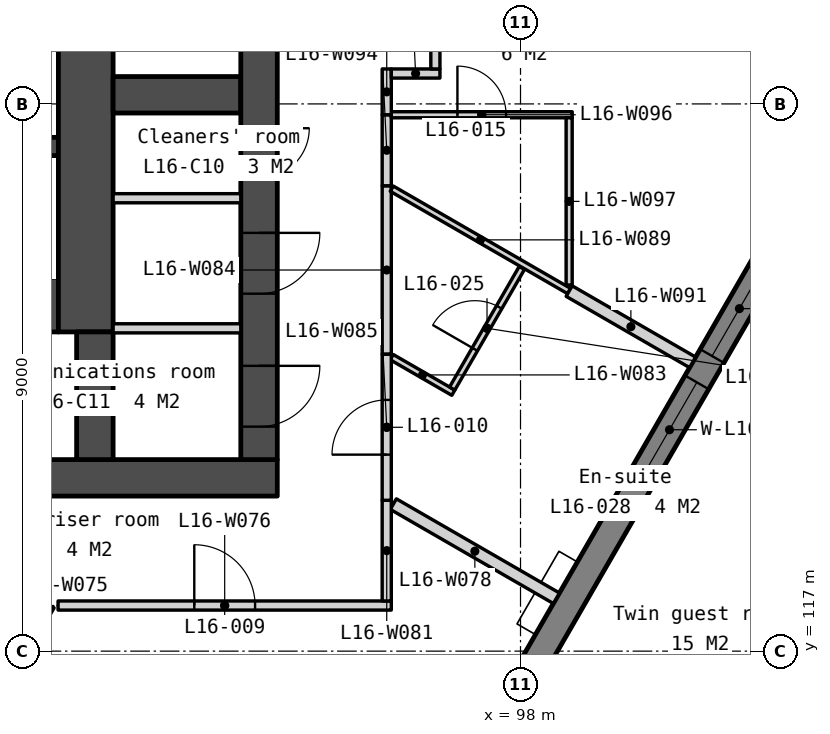
"""IFC4 building model, lengths in metres.
Left out: names, types, materials, properties, quantities, classifications, styles, units other than length and angle.
Written with IfcOpenShell. Run it as: python <this file> out.ifc"""

import sys

from ifc_helpers import new_model, si_unit, direction, frame, frame_2d, origin, place, context, subcontext, project, spatial, polyline, rectangle, outline, extrude, element, fill, save


model = new_model("IFC4")
c1 = context("Model", 3, precision=1e-05, world=origin(), true_north=direction((0.0, 1.0)))
c2 = subcontext(c1, "Body", "Model", "MODEL_VIEW")
j1 = project(units=[si_unit("LENGTHUNIT", "METRE"), si_unit("PLANEANGLEUNIT", "RADIAN")], contexts=[c1])
p1 = place(None, origin())
s1 = spatial("IfcSite", under=j1, at=p1, CompositionType="ELEMENT")
p2 = place(p1, origin())
s2 = spatial("IfcBuilding", under=s1, at=p2, CompositionType="ELEMENT")
p3 = place(p2, frame((0.0, 0.0, 70.0)))
s3 = spatial("IfcBuildingStorey", under=s2, at=p3, CompositionType="ELEMENT", Elevation=70.0)
p4 = place(p3, frame((66.0, 119.85, 0.0), z_axis=(0.0, 0.0, 1.0), x_axis=(1.0, 0.0, 0.0)))
e1 = element("IfcWall", 1, at=p4, inside=s3, PredefinedType="SOLIDWALL", context=c2, shape_type="SweptSolid", body=[
    extrude(rectangle(XDim=28.0, YDim=0.6, at=frame_2d((14.0, 0.0))), origin(), (0.0, 0.0, 1.0), 3.35),
])
p5 = place(p4, frame((6.825, 0.0, 0.0)))
e2 = element("IfcOpeningElement", 2, at=p5, cuts=e1, PredefinedType="OPENING", context=c2, shape_type="SweptSolid", body=[
    extrude(rectangle(XDim=1.8, YDim=2.1, at=frame_2d((0.9, 1.05))), frame((0.0, 0.31, 0.0), z_axis=(0.0, -1.0, 0.0), x_axis=(1.0, 0.0, 0.0)), (0.0, 0.0, 1.0), 0.62),
])
p6 = place(p4, frame((15.85, 0.0, 0.0)))
e3 = element("IfcOpeningElement", 3, at=p6, cuts=e1, PredefinedType="OPENING", context=c2, shape_type="SweptSolid", body=[
    extrude(rectangle(XDim=1.5, YDim=2.1, at=frame_2d((0.75, 1.05))), frame((0.0, 0.31, 0.0), z_axis=(0.0, -1.0, 0.0), x_axis=(1.0, 0.0, 0.0)), (0.0, 0.0, 1.0), 0.62),
])
p7 = place(p4, frame((19.375, 0.0, 0.0)))
e4 = element("IfcOpeningElement", 4, at=p7, cuts=e1, PredefinedType="OPENING", context=c2, shape_type="SweptSolid", body=[
    extrude(rectangle(XDim=1.8, YDim=2.1, at=frame_2d((0.9, 1.05))), frame((0.0, 0.31, 0.0), z_axis=(0.0, -1.0, 0.0), x_axis=(1.0, 0.0, 0.0)), (0.0, 0.0, 1.0), 0.62),
])
p8 = place(p4, frame((4.425, 0.0, 0.0)))
e5 = element("IfcOpeningElement", 5, at=p8, cuts=e1, PredefinedType="OPENING", context=c2, shape_type="SweptSolid", body=[
    extrude(rectangle(XDim=1.0, YDim=2.1, at=frame_2d((0.5, 1.05))), frame((0.0, 0.31, 0.0), z_axis=(0.0, -1.0, 0.0), x_axis=(1.0, 0.0, 0.0)), (0.0, 0.0, 1.0), 0.62),
])
p9 = place(p4, frame((9.783, 0.0, 0.0)))
e6 = element("IfcOpeningElement", 6, at=p9, cuts=e1, PredefinedType="OPENING", context=c2, shape_type="SweptSolid", body=[
    extrude(rectangle(XDim=1.0, YDim=2.1, at=frame_2d((0.5, 1.05))), frame((0.0, 0.31, 0.0), z_axis=(0.0, -1.0, 0.0), x_axis=(1.0, 0.0, 0.0)), (0.0, 0.0, 1.0), 0.62),
])
p10 = place(p4, frame((11.525, 0.0, 0.0)))
e7 = element("IfcOpeningElement", 7, at=p10, cuts=e1, PredefinedType="OPENING", context=c2, shape_type="SweptSolid", body=[
    extrude(rectangle(XDim=1.0, YDim=2.1, at=frame_2d((0.5, 1.05))), frame((0.0, 0.31, 0.0), z_axis=(0.0, -1.0, 0.0), x_axis=(1.0, 0.0, 0.0)), (0.0, 0.0, 1.0), 0.62),
])
p11 = place(p4, frame((13.658, 0.0, 0.0)))
e8 = element("IfcOpeningElement", 8, at=p11, cuts=e1, PredefinedType="OPENING", context=c2, shape_type="SweptSolid", body=[
    extrude(rectangle(XDim=1.0, YDim=2.1, at=frame_2d((0.5, 1.05))), frame((0.0, 0.31, 0.0), z_axis=(0.0, -1.0, 0.0), x_axis=(1.0, 0.0, 0.0)), (0.0, 0.0, 1.0), 0.62),
])
p12 = place(p4, frame((22.575, 0.0, 0.0)))
e9 = element("IfcOpeningElement", 9, at=p12, cuts=e1, PredefinedType="OPENING", context=c2, shape_type="SweptSolid", body=[
    extrude(rectangle(XDim=1.0, YDim=2.1, at=frame_2d((0.5, 1.05))), frame((0.0, 0.31, 0.0), z_axis=(0.0, -1.0, 0.0), x_axis=(1.0, 0.0, 0.0)), (0.0, 0.0, 1.0), 0.62),
])
p13 = place(p3, frame((87.85, 125.3, 0.0), z_axis=(0.0, 0.0, 1.0), x_axis=(1.0, 0.0, 0.0)))
e10 = element("IfcWall", 10, at=p13, inside=s3, PredefinedType="SOLIDWALL", context=c2, shape_type="SweptSolid", body=[
    extrude(rectangle(XDim=2.55, YDim=0.3, at=frame_2d((1.275, 0.0))), origin(), (0.0, 0.0, 1.0), 3.35),
])
p14 = place(p3, frame((87.85, 122.7, 0.0), z_axis=(0.0, 0.0, 1.0), x_axis=(1.0, 0.0, 0.0)))
e11 = element("IfcWall", 11, at=p14, inside=s3, PredefinedType="SOLIDWALL", context=c2, shape_type="SweptSolid", body=[
    extrude(rectangle(XDim=2.55, YDim=0.9, at=frame_2d((1.275, 0.0))), origin(), (0.0, 0.0, 1.0), 3.35),
])
p15 = place(p3, frame((90.85, 133.95, 0.0), z_axis=(0.0, 0.0, 1.0), x_axis=(0.0, -1.0, 0.0)))
e12 = element("IfcWall", 12, at=p15, inside=s3, PredefinedType="SOLIDWALL", context=c2, shape_type="SweptSolid", body=[
    extrude(rectangle(XDim=11.7, YDim=0.9, at=frame_2d((5.85, 0.0))), origin(), (0.0, 0.0, 1.0), 3.35),
])
p16 = place(p3, frame((91.0, 122.25, 0.0), z_axis=(0.0, 0.0, 1.0), x_axis=(0.0, -1.0, 0.0)))
e13 = element("IfcWall", 13, at=p16, inside=s3, PredefinedType="SOLIDWALL", context=c2, shape_type="SweptSolid", body=[
    extrude(rectangle(XDim=2.1, YDim=0.6, at=frame_2d((1.05, 0.0))), origin(), (0.0, 0.0, 1.0), 3.35),
])
p17 = place(p3, frame((91.3, 126.15, 0.0), z_axis=(0.0, 0.0, 1.0), x_axis=(1.0, 0.0, 0.0)))
e14 = element("IfcWall", 14, at=p17, inside=s3, PredefinedType="SOLIDWALL", context=c2, shape_type="SweptSolid", body=[
    extrude(rectangle(XDim=2.1, YDim=0.6, at=frame_2d((1.05, 0.0))), origin(), (0.0, 0.0, 1.0), 3.35),
])
for number, where, z_axis, x_axis in (
    (15, (91.3, 124.449, 0.0), (0.0, 0.0, 1.0), (1.0, 0.0, 0.0)),
    (16, (91.3, 122.309, 0.0), (0.0, 0.0, 1.0), (1.0, 0.0, 0.0)),
):
    element("IfcWall", number, at=place(p3, frame(where, z_axis=z_axis, x_axis=x_axis)), inside=s3, PredefinedType="PARTITIONING", context=c2, shape_type="SweptSolid", body=[
        extrude(rectangle(XDim=2.1, YDim=0.15, at=frame_2d((1.05, 0.0))), origin(), (0.0, 0.0, 1.0), 3.35),
    ])
p18 = place(p3, frame((93.7, 133.95, 0.0), z_axis=(0.0, 0.0, 1.0), x_axis=(0.0, -1.0, 0.0)))
e17 = element("IfcWall", 17, at=p18, inside=s3, PredefinedType="SOLIDWALL", context=c2, shape_type="SweptSolid", body=[
    extrude(rectangle(XDim=13.8, YDim=0.6, at=frame_2d((6.9, 0.0))), origin(), (0.0, 0.0, 1.0), 3.35),
])
p19 = place(p18, frame((0.6, 0.0, 0.0)))
e18 = element("IfcOpeningElement", 18, at=p19, cuts=e17, PredefinedType="OPENING", context=c2, shape_type="SweptSolid", body=[
    extrude(rectangle(XDim=1.1, YDim=2.1, at=frame_2d((0.55, 1.05))), frame((0.0, 0.31, 0.0), z_axis=(0.0, -1.0, 0.0), x_axis=(1.0, 0.0, 0.0)), (0.0, 0.0, 1.0), 0.62),
])
p20 = place(p18, frame((8.35, 0.0, 0.0)))
e19 = element("IfcOpeningElement", 19, at=p20, cuts=e17, PredefinedType="OPENING", context=c2, shape_type="SweptSolid", body=[
    extrude(rectangle(XDim=0.826, YDim=2.1, at=frame_2d((0.413, 1.05))), frame((0.0, 0.31, 0.0), z_axis=(0.0, -1.0, 0.0), x_axis=(1.0, 0.0, 0.0)), (0.0, 0.0, 1.0), 0.62),
])
p21 = place(p18, frame((10.071, 0.0, 0.0)))
e20 = element("IfcOpeningElement", 20, at=p21, cuts=e17, PredefinedType="OPENING", context=c2, shape_type="SweptSolid", body=[
    extrude(rectangle(XDim=1.0, YDim=2.1, at=frame_2d((0.5, 1.05))), frame((0.0, 0.31, 0.0), z_axis=(0.0, -1.0, 0.0), x_axis=(1.0, 0.0, 0.0)), (0.0, 0.0, 1.0), 0.62),
])
p22 = place(p18, frame((12.258, 0.0, 0.0)))
e21 = element("IfcOpeningElement", 21, at=p22, cuts=e17, PredefinedType="OPENING", context=c2, shape_type="SweptSolid", body=[
    extrude(rectangle(XDim=1.0, YDim=2.1, at=frame_2d((0.5, 1.05))), frame((0.0, 0.31, 0.0), z_axis=(0.0, -1.0, 0.0), x_axis=(1.0, 0.0, 0.0)), (0.0, 0.0, 1.0), 0.62),
])
p23 = place(p3, frame((88.435, 99.831, -0.15), z_axis=(0.0, 0.0, 1.0), x_axis=(0.500000806382, 0.866024938219, 0.0)))
e22 = element("IfcWall", 22, at=p23, inside=s3, PredefinedType="SOLIDWALL", context=c2, shape_type="SweptSolid", body=[
    extrude(outline(polyline([(34.14, 3.5), (34.14, 0.0), (0.0, 0.0), (0.0, 3.5), (34.14, 3.5)])), frame((0.0, 0.225, 0.0), z_axis=(0.0, -1.0, 0.0), x_axis=(1.0, 0.0, 0.0)), (0.0, 0.0, 1.0), 0.45),
])
p24 = place(p23, frame((5.21, 0.0, 1.05)))
e23 = element("IfcOpeningElement", 23, at=p24, cuts=e22, PredefinedType="OPENING", context=c2, shape_type="SweptSolid", body=[
    extrude(rectangle(XDim=1.8, YDim=1.5, at=frame_2d((0.9, 0.75))), frame((0.0, 0.235, 0.0), z_axis=(0.0, -1.0, 0.0), x_axis=(1.0, 0.0, 0.0)), (0.0, 0.0, 1.0), 0.47),
])
p25 = place(p23, frame((7.51, 0.0, 1.05)))
e24 = element("IfcOpeningElement", 24, at=p25, cuts=e22, PredefinedType="OPENING", context=c2, shape_type="SweptSolid", body=[
    extrude(rectangle(XDim=1.8, YDim=1.5, at=frame_2d((0.9, 0.75))), frame((0.0, 0.235, 0.0), z_axis=(0.0, -1.0, 0.0), x_axis=(1.0, 0.0, 0.0)), (0.0, 0.0, 1.0), 0.47),
])
p26 = place(p23, frame((14.17, 0.0, 1.05)))
e25 = element("IfcOpeningElement", 25, at=p26, cuts=e22, PredefinedType="OPENING", context=c2, shape_type="SweptSolid", body=[
    extrude(rectangle(XDim=1.8, YDim=1.5, at=frame_2d((0.9, 0.75))), frame((0.0, 0.235, 0.0), z_axis=(0.0, -1.0, 0.0), x_axis=(1.0, 0.0, 0.0)), (0.0, 0.0, 1.0), 0.47),
])
p27 = place(p23, frame((16.47, 0.0, 1.05)))
e26 = element("IfcOpeningElement", 26, at=p27, cuts=e22, PredefinedType="OPENING", context=c2, shape_type="SweptSolid", body=[
    extrude(rectangle(XDim=1.8, YDim=1.5, at=frame_2d((0.9, 0.75))), frame((0.0, 0.235, 0.0), z_axis=(0.0, -1.0, 0.0), x_axis=(1.0, 0.0, 0.0)), (0.0, 0.0, 1.0), 0.47),
])
p28 = place(p23, frame((23.13, 0.0, 1.05)))
e27 = element("IfcOpeningElement", 27, at=p28, cuts=e22, PredefinedType="OPENING", context=c2, shape_type="SweptSolid", body=[
    extrude(rectangle(XDim=1.8, YDim=1.5, at=frame_2d((0.9, 0.75))), frame((0.0, 0.235, 0.0), z_axis=(0.0, -1.0, 0.0), x_axis=(1.0, 0.0, 0.0)), (0.0, 0.0, 1.0), 0.47),
])
p29 = place(p23, frame((25.43, 0.0, 1.05)))
e28 = element("IfcOpeningElement", 28, at=p29, cuts=e22, PredefinedType="OPENING", context=c2, shape_type="SweptSolid", body=[
    extrude(rectangle(XDim=1.8, YDim=1.5, at=frame_2d((0.9, 0.75))), frame((0.0, 0.235, 0.0), z_axis=(0.0, -1.0, 0.0), x_axis=(1.0, 0.0, 0.0)), (0.0, 0.0, 1.0), 0.47),
])
p30 = place(p23, frame((32.154, 0.0, 1.05)))
e29 = element("IfcOpeningElement", 29, at=p30, cuts=e22, PredefinedType="OPENING", context=c2, shape_type="SweptSolid", body=[
    extrude(rectangle(XDim=1.2, YDim=1.5, at=frame_2d((0.6, 0.75))), frame((0.0, 0.235, 0.0), z_axis=(0.0, -1.0, 0.0), x_axis=(1.0, 0.0, 0.0)), (0.0, 0.0, 1.0), 0.47),
])
p31 = place(p3, frame((89.268, 116.023, 0.0), z_axis=(0.0, 0.0, 1.0), x_axis=(0.499906209203, 0.866079547155, 0.0)))
e30 = element("IfcWall", 30, at=p31, inside=s3, PredefinedType="PARTITIONING", context=c2, shape_type="SweptSolid", body=[
    extrude(rectangle(XDim=1.994, YDim=0.15, at=frame_2d((0.997, 0.0))), origin(), (0.0, 0.0, 1.0), 3.35),
])
p32 = place(p3, frame((90.395, 117.75, 0.0), z_axis=(0.0, 0.0, 1.0), x_axis=(1.0, 0.0, 0.0)))
e31 = element("IfcWall", 31, at=p32, inside=s3, PredefinedType="PARTITIONING", context=c2, shape_type="SweptSolid", body=[
    extrude(rectangle(XDim=5.48, YDim=0.15, at=frame_2d((2.74, 0.0))), origin(), (0.0, 0.0, 1.0), 3.35),
])
p33 = place(p32, frame((2.24, 0.0, 0.0)))
e32 = element("IfcOpeningElement", 32, at=p33, cuts=e31, PredefinedType="OPENING", context=c2, shape_type="SweptSolid", body=[
    extrude(rectangle(XDim=1.0, YDim=2.1, at=frame_2d((0.5, 1.05))), frame((0.0, 0.085, 0.0), z_axis=(0.0, -1.0, 0.0), x_axis=(1.0, 0.0, 0.0)), (0.0, 0.0, 1.0), 0.17),
])
p34 = place(p3, frame((95.908, 119.418, 0.0), z_axis=(0.0, 0.0, 1.0), x_axis=(0.866051688794, -0.499954470265, 0.0)))
e33 = element("IfcWall", 33, at=p34, inside=s3, PredefinedType="PARTITIONING", context=c2, shape_type="SweptSolid", body=[
    extrude(rectangle(XDim=3.097, YDim=0.2, at=frame_2d((1.548, 0.0))), origin(), (0.0, 0.0, 1.0), 3.35),
])
p35 = place(p3, frame((95.8, 117.825, 0.0), z_axis=(0.0, 0.0, 1.0), x_axis=(0.0, 1.0, 0.0)))
e34 = element("IfcWall", 34, at=p35, inside=s3, PredefinedType="PARTITIONING", context=c2, shape_type="SweptSolid", body=[
    extrude(rectangle(XDim=1.656, YDim=0.15, at=frame_2d((0.828, 0.0))), origin(), (0.0, 0.0, 1.0), 3.35),
])
p36 = place(p3, frame((95.882, 121.835, 0.0), z_axis=(0.0, 0.0, 1.0), x_axis=(0.86601174498, -0.500023656998, 0.0)))
e35 = element("IfcWall", 35, at=p36, inside=s3, PredefinedType="PARTITIONING", context=c2, shape_type="SweptSolid", body=[
    extrude(rectangle(XDim=1.169, YDim=0.1, at=frame_2d((0.585, 0.0))), origin(), (0.0, 0.0, 1.0), 3.35),
])
p37 = place(p3, frame((95.8, 121.883, 0.0), z_axis=(0.0, 0.0, 1.0), x_axis=(0.0, 1.0, 0.0)))
e36 = element("IfcWall", 36, at=p37, inside=s3, PredefinedType="PARTITIONING", context=c2, shape_type="SweptSolid", body=[
    extrude(rectangle(XDim=2.771, YDim=0.15, at=frame_2d((1.386, 0.0))), origin(), (0.0, 0.0, 1.0), 3.35),
])
p38 = place(p3, frame((95.8, 119.481, 0.0), z_axis=(0.0, 0.0, 1.0), x_axis=(0.0, 1.0, 0.0)))
e37 = element("IfcWall", 37, at=p38, inside=s3, PredefinedType="PARTITIONING", context=c2, shape_type="SweptSolid", body=[
    extrude(rectangle(XDim=2.402, YDim=0.15, at=frame_2d((1.201, 0.0))), origin(), (0.0, 0.0, 1.0), 3.35),
])
p39 = place(p38, frame((0.751, 0.0, 0.0)))
e38 = element("IfcOpeningElement", 38, at=p39, cuts=e37, PredefinedType="OPENING", context=c2, shape_type="SweptSolid", body=[
    extrude(rectangle(XDim=0.9, YDim=2.1, at=frame_2d((0.45, 1.05))), frame((0.0, 0.085, 0.0), z_axis=(0.0, -1.0, 0.0), x_axis=(1.0, 0.0, 0.0)), (0.0, 0.0, 1.0), 0.17),
])
p40 = place(p3, frame((95.882, 124.606, 0.0), z_axis=(0.0, 0.0, 1.0), x_axis=(0.866022675988, -0.500004724652, 0.0)))
e39 = element("IfcWall", 39, at=p40, inside=s3, PredefinedType="PARTITIONING", context=c2, shape_type="SweptSolid", body=[
    extrude(rectangle(XDim=3.369, YDim=0.1, at=frame_2d((1.685, 0.0))), origin(), (0.0, 0.0, 1.0), 3.35),
])
p41 = place(p3, frame((96.877, 121.319, 0.0), z_axis=(0.0, 0.0, 1.0), x_axis=(0.499968531483, 0.866043571379, 0.0)))
e40 = element("IfcWall", 40, at=p41, inside=s3, PredefinedType="PARTITIONING", context=c2, shape_type="SweptSolid", body=[
    extrude(rectangle(XDim=2.29, YDim=0.1, at=frame_2d((1.145, 0.0))), origin(), (0.0, 0.0, 1.0), 3.35),
])
p42 = place(p41, frame((0.745, 0.0, 0.0)))
e41 = element("IfcOpeningElement", 41, at=p42, cuts=e40, PredefinedType="OPENING", context=c2, shape_type="SweptSolid", body=[
    extrude(rectangle(XDim=0.8, YDim=2.1, at=frame_2d((0.4, 1.05))), frame((0.0, 0.06, 0.0), z_axis=(0.0, -1.0, 0.0), x_axis=(1.0, 0.0, 0.0)), (0.0, 0.0, 1.0), 0.12),
])
p43 = place(p3, frame((98.8, 122.922, 0.0), z_axis=(0.0, 0.0, 1.0), x_axis=(0.866036444415, -0.49998087658, 0.0)))
e42 = element("IfcWall", 42, at=p43, inside=s3, PredefinedType="PARTITIONING", context=c2, shape_type="SweptSolid", body=[
    extrude(rectangle(XDim=2.344, YDim=0.2, at=frame_2d((1.172, 0.0))), origin(), (0.0, 0.0, 1.0), 3.35),
])
p44 = place(p3, frame((95.8, 124.654, 0.0), z_axis=(0.0, 0.0, 1.0), x_axis=(0.0, 1.0, 0.0)))
e43 = element("IfcWall", 43, at=p44, inside=s3, PredefinedType="PARTITIONING", context=c2, shape_type="SweptSolid", body=[
    extrude(rectangle(XDim=1.168, YDim=0.15, at=frame_2d((0.584, 0.0))), origin(), (0.0, 0.0, 1.0), 3.35),
])
p45 = place(p3, frame((95.875, 125.822, 0.0), z_axis=(0.0, 0.0, 1.0), x_axis=(1.0, 0.0, 0.0)))
e44 = element("IfcWall", 44, at=p45, inside=s3, PredefinedType="PARTITIONING", context=c2, shape_type="SweptSolid", body=[
    extrude(rectangle(XDim=2.975, YDim=0.1, at=frame_2d((1.488, 0.0))), origin(), (0.0, 0.0, 1.0), 3.35),
])
p46 = place(p45, frame((1.087, 0.0, 0.0)))
e45 = element("IfcOpeningElement", 45, at=p46, cuts=e44, PredefinedType="OPENING", context=c2, shape_type="SweptSolid", body=[
    extrude(rectangle(XDim=0.8, YDim=2.1, at=frame_2d((0.4, 1.05))), frame((0.0, 0.06, 0.0), z_axis=(0.0, -1.0, 0.0), x_axis=(1.0, 0.0, 0.0)), (0.0, 0.0, 1.0), 0.12),
])
p47 = place(p3, frame((98.8, 123.022, 0.0), z_axis=(0.0, 0.0, 1.0), x_axis=(0.0, 1.0, 0.0)))
e46 = element("IfcWall", 46, at=p47, inside=s3, PredefinedType="PARTITIONING", context=c2, shape_type="SweptSolid", body=[
    extrude(rectangle(XDim=2.75, YDim=0.1, at=frame_2d((1.375, 0.0))), origin(), (0.0, 0.0, 1.0), 3.35),
])
p48 = place(p3, frame((95.8, 125.822, 0.0), z_axis=(0.0, 0.0, 1.0), x_axis=(0.0, 1.0, 0.0)))
e47 = element("IfcWall", 47, at=p48, inside=s3, PredefinedType="PARTITIONING", context=c2, shape_type="SweptSolid", body=[
    extrude(rectangle(XDim=0.753, YDim=0.15, at=frame_2d((0.376, 0.0))), origin(), (0.0, 0.0, 1.0), 3.35),
])
p49 = place(p3, frame((95.875, 126.5, 0.0), z_axis=(0.0, 0.0, 1.0), x_axis=(1.0, 0.0, 0.0)))
e48 = element("IfcWall", 48, at=p49, inside=s3, PredefinedType="PARTITIONING", context=c2, shape_type="SweptSolid", body=[
    extrude(rectangle(XDim=0.8, YDim=0.15, at=frame_2d((0.4, 0.0))), origin(), (0.0, 0.0, 1.0), 3.35),
])
p50 = place(p3, frame((96.6, 133.925, 0.0), z_axis=(0.0, 0.0, 1.0), x_axis=(6.643194e-05, -0.999999997793, 0.0)))
e49 = element("IfcWall", 49, at=p50, inside=s3, PredefinedType="PARTITIONING", context=c2, shape_type="SweptSolid", body=[
    extrude(rectangle(XDim=7.35, YDim=0.15, at=frame_2d((3.675, 0.0))), origin(), (0.0, 0.0, 1.0), 3.35),
])
p51 = place(p50, frame((3.175, 0.0, 0.0)))
e50 = element("IfcOpeningElement", 50, at=p51, cuts=e49, PredefinedType="OPENING", context=c2, shape_type="SweptSolid", body=[
    extrude(rectangle(XDim=1.0, YDim=2.1, at=frame_2d((0.5, 1.05))), frame((0.0, 0.085, 0.0), z_axis=(0.0, -1.0, 0.0), x_axis=(1.0, 0.0, 0.0)), (0.0, 0.0, 1.0), 0.17),
])
p52 = place(p20, origin())
e51 = element("IfcDoor", 51, at=p52, inside=s3, OperationType="SINGLE_SWING_LEFT", PredefinedType="DOOR", context=c2, shape_type="SweptSolid", body=[
    extrude(rectangle(XDim=0.826, YDim=2.1, at=frame_2d((0.413, 1.05))), frame((0.0, 0.025, 0.0), z_axis=(0.0, -1.0, 0.0), x_axis=(1.0, 0.0, 0.0)), (0.0, 0.0, 1.0), 0.05),
])
fill(e19, e51)
p53 = place(p21, origin())
e52 = element("IfcDoor", 52, at=p53, inside=s3, OperationType="SINGLE_SWING_LEFT", PredefinedType="DOOR", context=c2, shape_type="SweptSolid", body=[
    extrude(rectangle(XDim=1.0, YDim=2.1, at=frame_2d((0.5, 1.05))), frame((0.0, 0.025, 0.0), z_axis=(0.0, -1.0, 0.0), x_axis=(1.0, 0.0, 0.0)), (0.0, 0.0, 1.0), 0.05),
])
fill(e20, e52)
p54 = place(p22, origin())
e53 = element("IfcDoor", 53, at=p54, inside=s3, OperationType="SINGLE_SWING_LEFT", PredefinedType="DOOR", context=c2, shape_type="SweptSolid", body=[
    extrude(rectangle(XDim=1.0, YDim=2.1, at=frame_2d((0.5, 1.05))), frame((0.0, 0.025, 0.0), z_axis=(0.0, -1.0, 0.0), x_axis=(1.0, 0.0, 0.0)), (0.0, 0.0, 1.0), 0.05),
])
fill(e21, e53)
p55 = place(p28, origin())
e54 = element("IfcWindow", 54, at=p55, inside=s3, PartitioningType="SINGLE_PANEL", PredefinedType="WINDOW", context=c2, shape_type="SweptSolid", body=[
    extrude(rectangle(XDim=1.8, YDim=1.5, at=frame_2d((0.9, 0.75))), frame((0.0, 0.03, 0.0), z_axis=(0.0, -1.0, 0.0), x_axis=(1.0, 0.0, 0.0)), (0.0, 0.0, 1.0), 0.06),
])
fill(e27, e54)
p56 = place(p29, origin())
e55 = element("IfcWindow", 55, at=p56, inside=s3, PartitioningType="SINGLE_PANEL", PredefinedType="WINDOW", context=c2, shape_type="SweptSolid", body=[
    extrude(rectangle(XDim=1.8, YDim=1.5, at=frame_2d((0.9, 0.75))), frame((0.0, 0.03, 0.0), z_axis=(0.0, -1.0, 0.0), x_axis=(1.0, 0.0, 0.0)), (0.0, 0.0, 1.0), 0.06),
])
fill(e28, e55)
p57 = place(p33, origin())
e56 = element("IfcDoor", 56, at=p57, inside=s3, OperationType="SINGLE_SWING_LEFT", PredefinedType="DOOR", context=c2, shape_type="SweptSolid", body=[
    extrude(rectangle(XDim=1.0, YDim=2.1, at=frame_2d((0.5, 1.05))), frame((0.0, 0.025, 0.0), z_axis=(0.0, -1.0, 0.0), x_axis=(1.0, 0.0, 0.0)), (0.0, 0.0, 1.0), 0.05),
])
fill(e32, e56)
p58 = place(p39, origin())
e57 = element("IfcDoor", 57, at=p58, inside=s3, OperationType="SINGLE_SWING_LEFT", PredefinedType="DOOR", context=c2, shape_type="SweptSolid", body=[
    extrude(rectangle(XDim=0.9, YDim=2.1, at=frame_2d((0.45, 1.05))), frame((0.0, 0.025, 0.0), z_axis=(0.0, -1.0, 0.0), x_axis=(1.0, 0.0, 0.0)), (0.0, 0.0, 1.0), 0.05),
])
fill(e38, e57)
p59 = place(p46, origin())
e58 = element("IfcDoor", 58, at=p59, inside=s3, OperationType="SINGLE_SWING_LEFT", PredefinedType="DOOR", context=c2, shape_type="SweptSolid", body=[
    extrude(rectangle(XDim=0.8, YDim=2.1, at=frame_2d((0.4, 1.05))), frame((0.0, 0.025, 0.0), z_axis=(0.0, -1.0, 0.0), x_axis=(1.0, 0.0, 0.0)), (0.0, 0.0, 1.0), 0.05),
])
fill(e45, e58)
p60 = place(p42, origin())
e59 = element("IfcDoor", 59, at=p60, inside=s3, OperationType="SINGLE_SWING_LEFT", PredefinedType="DOOR", context=c2, shape_type="SweptSolid", body=[
    extrude(rectangle(XDim=0.8, YDim=2.1, at=frame_2d((0.4, 1.05))), frame((0.0, 0.025, 0.0), z_axis=(0.0, -1.0, 0.0), x_axis=(1.0, 0.0, 0.0)), (0.0, 0.0, 1.0), 0.05),
])
fill(e41, e59)
save(model, sys.argv[1])
